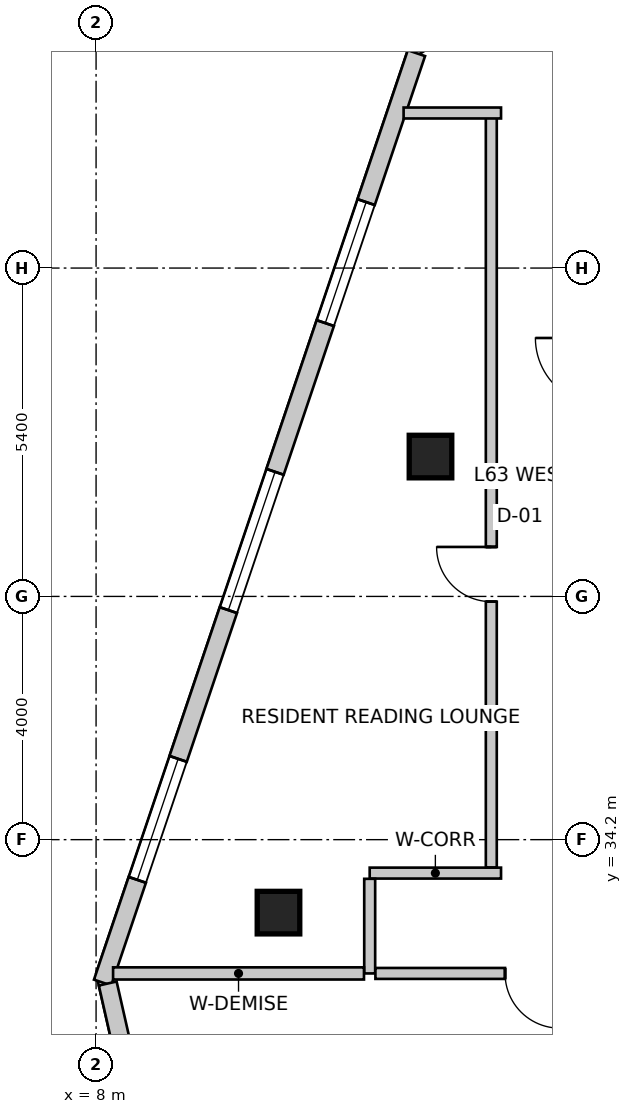
"""IFC4 building model, lengths in metres.
Left out: names, types, materials, properties, quantities, classifications, styles, units other than length and angle.
Written with IfcOpenShell. Run it as: python <this file> out.ifc"""

import sys

from ifc_helpers import new_model, si_unit, direction, frame, frame_2d, origin, origin_2d, place, context, subcontext, project, spatial, rectangle, extrude, source, transform, mapped, element, fill, save


model = new_model("IFC4")
c1 = context("Model", 3, precision=1e-05, world=origin(), true_north=direction((0.0, 1.0)))
c2 = subcontext(c1, "Body", "Model", "MODEL_VIEW")
j1 = project(units=[si_unit("LENGTHUNIT", "METRE"), si_unit("PLANEANGLEUNIT", "RADIAN")], contexts=[c1])
p1 = place(None, origin())
s1 = spatial("IfcSite", under=j1, at=p1, CompositionType="ELEMENT")
p2 = place(p1, origin())
s2 = spatial("IfcBuilding", under=s1, at=p2, CompositionType="ELEMENT")
p3 = place(p2, frame((0.0, 0.0, 249.3)))
s3 = spatial("IfcBuildingStorey", under=s2, at=p3, CompositionType="ELEMENT", Elevation=249.3)
m1 = source(origin(), c2, "Body", "SweptSolid", [
    extrude(rectangle(XDim=0.7, YDim=0.7, at=origin_2d()), origin(), (0.0, 0.0, 1.0), 3.6),
])
for number, where, z_axis, x_axis in (
    (1, (11.0, 33.0, 0.0), (0.0, 0.0, 1.0), (1.0, 0.0, 0.0)),
    (2, (13.5, 40.5, 0.0), (0.0, 0.0, 1.0), (1.0, 0.0, 0.0)),
):
    element("IfcColumn", number, at=place(p3, frame(where, z_axis=z_axis, x_axis=x_axis)), inside=s3, PredefinedType="COLUMN", context=c2, shape_type="MappedRepresentation", body=[
        mapped(m1, transform((0.0, 0.0, 0.0), scale=1.0)),
    ])
p4 = place(p3, frame((21.874, 52.742, 0.0), z_axis=(0.0, 0.0, 1.0), x_axis=(-0.84365659959, -0.536883173482, 0.0)))
e3 = element("IfcWall", 3, at=p4, inside=s3, PredefinedType="SOLIDWALL", context=c2, shape_type="SweptSolid", body=[
    extrude(rectangle(XDim=10.283, YDim=0.3, at=frame_2d((5.142, 0.0))), origin(), (0.0, 0.0, 1.0), 3.35),
])
m2 = source(origin(), c2, "Body", "SweptSolid", [
    extrude(rectangle(XDim=2.4, YDim=2.2, at=frame_2d((1.2, 1.1))), frame((0.0, 0.16, 0.0), z_axis=(0.0, -1.0, 0.0), x_axis=(1.0, 0.0, 0.0)), (0.0, 0.0, 1.0), 0.32),
])
p5 = place(p4, frame((1.26, 0.0, 0.85)))
e4 = element("IfcOpeningElement", 4, at=p5, cuts=e3, PredefinedType="OPENING", context=c2, shape_type="MappedRepresentation", body=[
    mapped(m2, transform((0.0, 0.0, 0.0), scale=1.0)),
])
m3 = source(origin(), c2, "Body", "SweptSolid", [
    extrude(rectangle(XDim=2.1, YDim=2.0, at=frame_2d((1.05, 1.0))), frame((0.0, 0.16, 0.0), z_axis=(0.0, -1.0, 0.0), x_axis=(1.0, 0.0, 0.0)), (0.0, 0.0, 1.0), 0.32),
])
p6 = place(p4, frame((5.69, 0.0, 0.85)))
e5 = element("IfcOpeningElement", 5, at=p6, cuts=e3, PredefinedType="OPENING", context=c2, shape_type="MappedRepresentation", body=[
    mapped(m3, transform((0.0, 0.0, 0.0), scale=1.0)),
])
p7 = place(p3, frame((13.269, 47.134, 0.0), z_axis=(0.0, 0.0, 1.0), x_axis=(-0.3199211297, -0.947444178182, 0.0)))
e6 = element("IfcWall", 6, at=p7, inside=s3, PredefinedType="SOLIDWALL", context=c2, shape_type="SweptSolid", body=[
    extrude(rectangle(XDim=16.132, YDim=0.3, at=frame_2d((8.066, 0.0))), origin(), (0.0, 0.0, 1.0), 3.35),
])
p8 = place(p7, frame((2.585, 0.0, 0.85)))
e7 = element("IfcOpeningElement", 7, at=p8, cuts=e6, PredefinedType="OPENING", context=c2, shape_type="MappedRepresentation", body=[
    mapped(m3, transform((0.0, 0.0, 0.0), scale=1.0)),
])
p9 = place(p7, frame((7.267, 0.0, 0.85)))
e8 = element("IfcOpeningElement", 8, at=p9, cuts=e6, PredefinedType="OPENING", context=c2, shape_type="MappedRepresentation", body=[
    mapped(m2, transform((0.0, 0.0, 0.0), scale=1.0)),
])
p10 = place(p7, frame((12.249, 0.0, 0.85)))
e9 = element("IfcOpeningElement", 9, at=p10, cuts=e6, PredefinedType="OPENING", context=c2, shape_type="MappedRepresentation", body=[
    mapped(m3, transform((0.0, 0.0, 0.0), scale=1.0)),
])
p11 = place(p3, frame((8.191, 31.834, 0.0), z_axis=(0.0, 0.0, 1.0), x_axis=(0.221636032737, -0.975129462683, 0.0)))
e10 = element("IfcWall", 10, at=p11, inside=s3, PredefinedType="SOLIDWALL", context=c2, shape_type="SweptSolid", body=[
    extrude(rectangle(XDim=10.602, YDim=0.3, at=frame_2d((5.301, 0.0))), origin(), (0.0, 0.0, 1.0), 3.35),
])
p12 = place(p11, frame((2.351, 0.0, 0.85)))
e11 = element("IfcOpeningElement", 11, at=p12, cuts=e10, PredefinedType="OPENING", context=c2, shape_type="MappedRepresentation", body=[
    mapped(m2, transform((0.0, 0.0, 0.0), scale=1.0)),
])
p13 = place(p11, frame((7.552, 0.0, 0.85)))
e12 = element("IfcOpeningElement", 12, at=p13, cuts=e10, PredefinedType="OPENING", context=c2, shape_type="MappedRepresentation", body=[
    mapped(m2, transform((0.0, 0.0, 0.0), scale=1.0)),
])
p14 = place(p3, frame((12.5, 33.65, 0.0), z_axis=(0.0, 0.0, 1.0), x_axis=(1.0, 0.0, 0.0)))
e13 = element("IfcWall", 13, at=p14, inside=s3, PredefinedType="PARTITIONING", context=c2, shape_type="SweptSolid", body=[
    extrude(rectangle(XDim=2.16, YDim=0.18, at=frame_2d((1.08, 0.0))), origin(), (0.0, 0.0, 1.0), 3.35),
])
p15 = place(p3, frame((12.5, 32.0, 0.0), z_axis=(0.0, 0.0, 1.0), x_axis=(0.0, 1.0, 0.0)))
e14 = element("IfcWall", 14, at=p15, inside=s3, PredefinedType="PARTITIONING", context=c2, shape_type="SweptSolid", body=[
    extrude(rectangle(XDim=1.556, YDim=0.18, at=frame_2d((0.778, 0.0))), origin(), (0.0, 0.0, 1.0), 2.935),
])
p16 = place(p3, frame((17.635, 32.0, 0.0), z_axis=(0.0, 0.0, 1.0), x_axis=(-1.0, 0.0, 0.0)))
e15 = element("IfcWall", 15, at=p16, inside=s3, PredefinedType="PARTITIONING", context=c2, shape_type="SweptSolid", body=[
    extrude(rectangle(XDim=5.041, YDim=0.18, at=frame_2d((2.521, 0.0))), origin(), (0.0, 0.0, 1.0), 2.935),
])
m4 = source(origin(), c2, "Body", "SweptSolid", [
    extrude(rectangle(XDim=0.9, YDim=2.15, at=frame_2d((0.45, 1.075))), frame((0.0, 0.1, 0.0), z_axis=(0.0, -1.0, 0.0), x_axis=(1.0, 0.0, 0.0)), (0.0, 0.0, 1.0), 0.2),
])
p17 = place(p16, frame((2.009, 0.0, 0.0)))
e16 = element("IfcOpeningElement", 16, at=p17, cuts=e15, PredefinedType="OPENING", context=c2, shape_type="MappedRepresentation", body=[
    mapped(m4, transform((0.0, 0.0, 0.0), scale=1.0)),
])
p18 = place(p3, frame((14.5, 33.744, 0.0), z_axis=(0.0, 0.0, 1.0), x_axis=(0.0, 1.0, 0.0)))
e17 = element("IfcWall", 17, at=p18, inside=s3, PredefinedType="PARTITIONING", context=c2, shape_type="SweptSolid", body=[
    extrude(rectangle(XDim=12.406, YDim=0.18, at=frame_2d((6.203, 0.0))), origin(), (0.0, 0.0, 1.0), 3.35),
])
p19 = place(p18, frame((4.37, 0.0, 0.0)))
e18 = element("IfcOpeningElement", 18, at=p19, cuts=e17, PredefinedType="OPENING", context=c2, shape_type="MappedRepresentation", body=[
    mapped(m4, transform((0.0, 0.0, 0.0), scale=1.0)),
])
p20 = place(p3, frame((14.66, 46.15, 0.0), z_axis=(0.0, 0.0, 1.0), x_axis=(-1.0, 0.0, 0.0)))
e19 = element("IfcWall", 19, at=p20, inside=s3, PredefinedType="PARTITIONING", context=c2, shape_type="SweptSolid", body=[
    extrude(rectangle(XDim=1.602, YDim=0.18, at=frame_2d((0.801, 0.0))), origin(), (0.0, 0.0, 1.0), 3.35),
])
p21 = place(p3, frame((12.406, 32.0, 0.0), z_axis=(0.0, 0.0, 1.0), x_axis=(-1.0, 0.0, 0.0)))
e20 = element("IfcWall", 20, at=p21, inside=s3, PredefinedType="PARTITIONING", context=c2, shape_type="SweptSolid", body=[
    extrude(rectangle(XDim=4.126, YDim=0.2, at=frame_2d((2.063, 0.0))), origin(), (0.0, 0.0, 1.0), 2.642),
])
m5 = source(origin(), c2, "Body", "SweptSolid", [
    extrude(rectangle(XDim=2.1, YDim=2.0, at=frame_2d((1.05, 1.0))), frame((0.0, -0.015, 0.0), z_axis=(0.0, -1.0, 0.0), x_axis=(1.0, 0.0, 0.0)), (0.0, 0.0, 1.0), 0.06),
])
p22 = place(p8, origin())
e21 = element("IfcWindow", 21, at=p22, inside=s3, PartitioningType="SINGLE_PANEL", PredefinedType="WINDOW", context=c2, shape_type="MappedRepresentation", body=[
    mapped(m5, transform((0.0, 0.0, 0.0), scale=1.0)),
])
fill(e7, e21)
m6 = source(origin(), c2, "Body", "SweptSolid", [
    extrude(rectangle(XDim=2.4, YDim=2.2, at=frame_2d((1.2, 1.1))), frame((0.0, -0.015, 0.0), z_axis=(0.0, -1.0, 0.0), x_axis=(1.0, 0.0, 0.0)), (0.0, 0.0, 1.0), 0.06),
])
p23 = place(p9, origin())
e22 = element("IfcWindow", 22, at=p23, inside=s3, PartitioningType="SINGLE_PANEL", PredefinedType="WINDOW", context=c2, shape_type="MappedRepresentation", body=[
    mapped(m6, transform((0.0, 0.0, 0.0), scale=1.0)),
])
fill(e8, e22)
p24 = place(p10, origin())
e23 = element("IfcWindow", 23, at=p24, inside=s3, PartitioningType="SINGLE_PANEL", PredefinedType="WINDOW", context=c2, shape_type="MappedRepresentation", body=[
    mapped(m5, transform((0.0, 0.0, 0.0), scale=1.0)),
])
fill(e9, e23)
m7 = source(origin(), c2, "Body", "SweptSolid", [
    extrude(rectangle(XDim=0.9, YDim=2.15, at=frame_2d((0.45, 1.075))), frame((0.0, 0.025, 0.0), z_axis=(0.0, -1.0, 0.0), x_axis=(1.0, 0.0, 0.0)), (0.0, 0.0, 1.0), 0.05),
])
p25 = place(p19, origin())
e24 = element("IfcDoor", 24, at=p25, inside=s3, OperationType="SINGLE_SWING_RIGHT", PredefinedType="DOOR", context=c2, shape_type="MappedRepresentation", body=[
    mapped(m7, transform((0.0, 0.0, 0.0), scale=1.0)),
])
fill(e18, e24)
m8 = source(origin(), c2, "Body", "SweptSolid", [
    extrude(rectangle(XDim=0.9, YDim=2.15, at=frame_2d((0.45, 1.075))), frame((0.0, 0.025, 0.0), z_axis=(0.0, -1.0, 0.0), x_axis=(1.0, 0.0, 0.0)), (0.0, 0.0, 1.0), 0.05),
])
p26 = place(p17, origin())
e25 = element("IfcDoor", 25, at=p26, inside=s3, OperationType="SINGLE_SWING_LEFT", PredefinedType="DOOR", context=c2, shape_type="MappedRepresentation", body=[
    mapped(m8, transform((0.0, 0.0, 0.0), scale=1.0)),
])
fill(e16, e25)
save(model, sys.argv[1])
